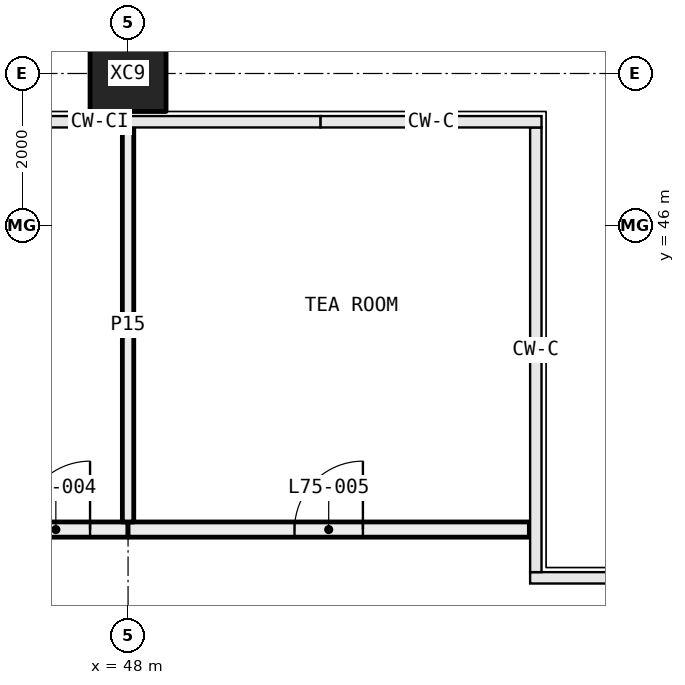
"""IFC4 building model, lengths in metres.
Left out: names, types, materials, properties, quantities, classifications, styles, units other than length and angle.
Written with IfcOpenShell. Run it as: python <this file> out.ifc"""

import sys

from ifc_helpers import new_model, si_unit, direction, frame, frame_2d, origin, origin_2d, place, context, subcontext, project, spatial, rectangle, hollow_rectangle, extrude, element, fill, save


model = new_model("IFC4")
c1 = context("Model", 3, precision=1e-05, world=origin(), true_north=direction((0.0, 1.0)))
c2 = subcontext(c1, "Body", "Model", "MODEL_VIEW")
j1 = project(units=[si_unit("LENGTHUNIT", "METRE"), si_unit("PLANEANGLEUNIT", "RADIAN")], contexts=[c1])
p1 = place(None, origin())
s1 = spatial("IfcSite", under=j1, at=p1, CompositionType="ELEMENT")
p2 = place(p1, origin())
s2 = spatial("IfcBuilding", under=s1, at=p2, CompositionType="ELEMENT")
p3 = place(p2, frame((0.0, 0.0, 277.95)))
s3 = spatial("IfcBuildingStorey", under=s2, at=p3, CompositionType="ELEMENT", Elevation=277.95)
p4 = place(p3, frame((48.0, 48.0, -0.4), z_axis=(0.0, 0.0, 1.0), x_axis=(1.0, 0.0, 0.0)))
e1 = element("IfcColumn", 1, at=p4, inside=s3, PredefinedType="COLUMN", context=c2, shape_type="SweptSolid", body=[
    extrude(hollow_rectangle(XDim=1.0, YDim=1.0, WallThickness=0.036, at=origin_2d()), origin(), (0.0, 0.0, 1.0), 5.4),
])
p5 = place(p3, frame((48.0, 42.0, 0.0), z_axis=(0.0, 0.0, 1.0), x_axis=(-1.0, 0.0, 0.0)))
e2 = element("IfcWall", 2, at=p5, inside=s3, PredefinedType="PARTITIONING", context=c2, shape_type="SweptSolid", body=[
    extrude(rectangle(XDim=1.9, YDim=0.2, at=frame_2d((0.95, 0.0))), origin(), (0.0, 0.0, 1.0), 5.0),
])
p6 = place(p5, frame((0.5, 0.0, 0.0)))
e3 = element("IfcOpeningElement", 3, at=p6, cuts=e2, PredefinedType="OPENING", context=c2, shape_type="SweptSolid", body=[
    extrude(rectangle(XDim=0.9, YDim=2.1, at=frame_2d((0.45, 1.05))), frame((0.0, 0.11, 0.0), z_axis=(0.0, -1.0, 0.0), x_axis=(1.0, 0.0, 0.0)), (0.0, 0.0, 1.0), 0.22),
])
p7 = place(p3, frame((53.28, 42.0, 0.0), z_axis=(0.0, 0.0, 1.0), x_axis=(-1.0, 0.0, 0.0)))
e4 = element("IfcWall", 4, at=p7, inside=s3, PredefinedType="PARTITIONING", context=c2, shape_type="SweptSolid", body=[
    extrude(rectangle(XDim=5.28, YDim=0.2, at=frame_2d((2.64, 0.0))), origin(), (0.0, 0.0, 1.0), 5.0),
])
p8 = place(p7, frame((2.19, 0.0, 0.0)))
e5 = element("IfcOpeningElement", 5, at=p8, cuts=e4, PredefinedType="OPENING", context=c2, shape_type="SweptSolid", body=[
    extrude(rectangle(XDim=0.9, YDim=2.1, at=frame_2d((0.45, 1.05))), frame((0.0, 0.11, 0.0), z_axis=(0.0, -1.0, 0.0), x_axis=(1.0, 0.0, 0.0)), (0.0, 0.0, 1.0), 0.22),
])
p9 = place(p3, frame((48.0, 42.1, 0.0), z_axis=(0.0, 0.0, 1.0), x_axis=(0.0, 1.0, 0.0)))
e6 = element("IfcWall", 6, at=p9, inside=s3, PredefinedType="PARTITIONING", context=c2, shape_type="SweptSolid", body=[
    extrude(rectangle(XDim=5.18, YDim=0.15, at=frame_2d((2.59, 0.0))), origin(), (0.0, 0.0, 1.0), 5.0),
])
p10 = place(p6, frame((0.9, 0.0, 0.0), x_axis=(-1.0, 0.0, 0.0)))
e7 = element("IfcDoor", 7, at=p10, inside=s3, OperationType="SINGLE_SWING_LEFT", PredefinedType="DOOR", context=c2, shape_type="SweptSolid", body=[
    extrude(rectangle(XDim=0.9, YDim=2.1, at=frame_2d((0.45, 1.05))), frame((0.0, 0.025, 0.0), z_axis=(0.0, -1.0, 0.0), x_axis=(1.0, 0.0, 0.0)), (0.0, 0.0, 1.0), 0.05),
])
fill(e3, e7)
p11 = place(p8, frame((0.9, 0.0, 0.0), x_axis=(-1.0, 0.0, 0.0)))
e8 = element("IfcDoor", 8, at=p11, inside=s3, OperationType="SINGLE_SWING_LEFT", PredefinedType="DOOR", context=c2, shape_type="SweptSolid", body=[
    extrude(rectangle(XDim=0.9, YDim=2.1, at=frame_2d((0.45, 1.05))), frame((0.0, 0.025, 0.0), z_axis=(0.0, -1.0, 0.0), x_axis=(1.0, 0.0, 0.0)), (0.0, 0.0, 1.0), 0.05),
])
fill(e5, e8)
save(model, sys.argv[1])
